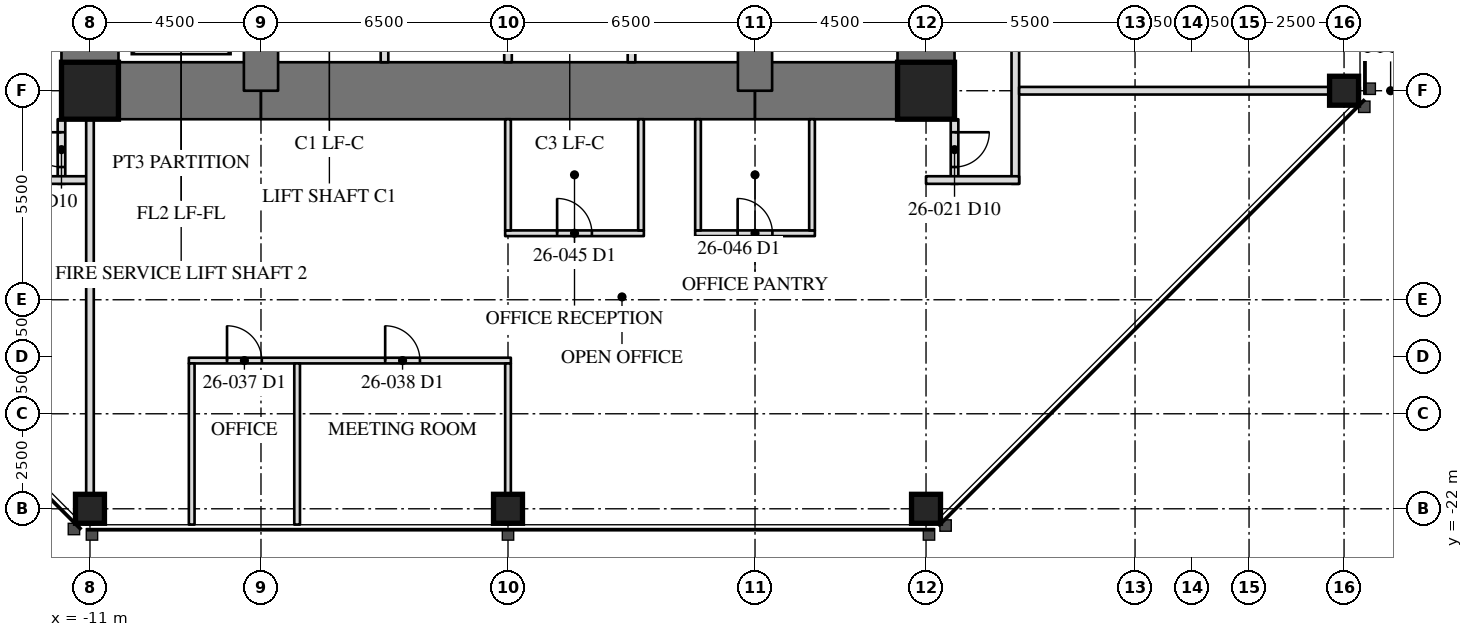
"""IFC4 building model, lengths in metres.
Left out: names, types, materials, properties, quantities, classifications, styles, units other than length and angle.
Written with IfcOpenShell. Run it as: python <this file> out.ifc"""

import sys

from ifc_helpers import new_model, si_unit, direction, frame, frame_2d, origin, origin_2d, place, context, subcontext, project, spatial, rectangle, hollow_rectangle, extrude, element, fill, save


model = new_model("IFC4")
c1 = context("Model", 3, precision=1e-05, world=origin(), true_north=direction((0.0, 1.0)))
c2 = subcontext(c1, "Body", "Model", "MODEL_VIEW")
j1 = project(units=[si_unit("LENGTHUNIT", "METRE"), si_unit("PLANEANGLEUNIT", "RADIAN")], contexts=[c1])
p1 = place(None, origin())
s1 = spatial("IfcSite", under=j1, at=p1, CompositionType="ELEMENT")
p2 = place(p1, origin())
s2 = spatial("IfcBuilding", under=s1, at=p2, CompositionType="ELEMENT")
p3 = place(p2, frame((0.0, 0.0, 113.1)))
s3 = spatial("IfcBuildingStorey", under=s2, at=p3, CompositionType="ELEMENT", Elevation=113.1)
for number, where, z_axis, x_axis in (
    (1, (-11.0, -22.0, 0.0), (0.0, 0.0, 1.0), (1.0, 0.0, 0.0)),
    (2, (0.0, -22.0, 0.0), (0.0, 0.0, 1.0), (1.0, 0.0, 0.0)),
    (3, (11.0, -22.0, 0.0), (0.0, 0.0, 1.0), (1.0, 0.0, 0.0)),
    (4, (22.0, -11.0, 0.0), (0.0, 0.0, 1.0), (0.0, 1.0, 0.0)),
):
    element("IfcColumn", number, at=place(p3, frame(where, z_axis=z_axis, x_axis=x_axis)), inside=s3, PredefinedType="COLUMN", context=c2, shape_type="SweptSolid", body=[
        extrude(hollow_rectangle(XDim=0.762, YDim=0.762, WallThickness=0.127, at=origin_2d()), origin(), (0.0, 0.0, 1.0), 4.1),
    ])
p4 = place(p3, frame((11.0, -11.0, 0.0), z_axis=(0.0, 0.0, 1.0), x_axis=(0.0, 1.0, 0.0)))
e5 = element("IfcWall", 5, at=p4, inside=s3, PredefinedType="SHEAR", context=c2, shape_type="SweptSolid", body=[
    extrude(rectangle(XDim=22.0, YDim=1.5, at=frame_2d((11.0, 0.0))), origin(), (0.0, 0.0, 1.0), 4.1),
])
p5 = place(p4, frame((15.393, 0.0, 0.0)))
e6 = element("IfcOpeningElement", 6, at=p5, cuts=e5, PredefinedType="OPENING", context=c2, shape_type="SweptSolid", body=[
    extrude(rectangle(XDim=0.915, YDim=2.134, at=frame_2d((0.458, 1.067))), frame((0.0, 0.76, 0.0), z_axis=(0.0, -1.0, 0.0), x_axis=(1.0, 0.0, 0.0)), (0.0, 0.0, 1.0), 1.52),
])
p6 = place(p3, frame((-11.0, 11.0, 0.0), z_axis=(0.0, 0.0, 1.0), x_axis=(0.0, -1.0, 0.0)))
e7 = element("IfcWall", 7, at=p6, inside=s3, PredefinedType="SHEAR", context=c2, shape_type="SweptSolid", body=[
    extrude(rectangle(XDim=22.0, YDim=1.5, at=frame_2d((11.0, 0.0))), origin(), (0.0, 0.0, 1.0), 4.1),
])
p7 = place(p6, frame((15.393, 0.0, 0.0)))
e8 = element("IfcOpeningElement", 8, at=p7, cuts=e7, PredefinedType="OPENING", context=c2, shape_type="SweptSolid", body=[
    extrude(rectangle(XDim=0.915, YDim=2.134, at=frame_2d((0.458, 1.067))), frame((0.0, 0.76, 0.0), z_axis=(0.0, -1.0, 0.0), x_axis=(1.0, 0.0, 0.0)), (0.0, 0.0, 1.0), 1.52),
])
p8 = place(p3, frame((-11.0, -11.0, 0.0), z_axis=(0.0, 0.0, 1.0), x_axis=(1.0, 0.0, 0.0)))
e9 = element("IfcWall", 9, at=p8, inside=s3, PredefinedType="SHEAR", context=c2, shape_type="SweptSolid", body=[
    extrude(rectangle(XDim=4.5, YDim=1.5, at=frame_2d((2.25, 0.0))), origin(), (0.0, 0.0, 1.0), 4.1),
])
p9 = place(p3, frame((-6.5, -11.0, 0.0), z_axis=(0.0, 0.0, 1.0), x_axis=(1.0, 0.0, 0.0)))
e10 = element("IfcWall", 10, at=p9, inside=s3, PredefinedType="SHEAR", context=c2, shape_type="SweptSolid", body=[
    extrude(rectangle(XDim=13.0, YDim=1.5, at=frame_2d((6.5, 0.0))), origin(), (0.0, 0.0, 1.0), 4.1),
])
p10 = place(p3, frame((6.5, -11.0, 0.0), z_axis=(0.0, 0.0, 1.0), x_axis=(1.0, 0.0, 0.0)))
e11 = element("IfcWall", 11, at=p10, inside=s3, PredefinedType="SHEAR", context=c2, shape_type="SweptSolid", body=[
    extrude(rectangle(XDim=4.5, YDim=1.5, at=frame_2d((2.25, 0.0))), origin(), (0.0, 0.0, 1.0), 4.1),
])
for number, where, z_axis, x_axis in (
    (12, (6.5, -11.0, 0.0), (0.0, 0.0, 1.0), (0.0, 1.0, 0.0)),
    (13, (-6.5, -6.5, 0.0), (0.0, 0.0, 1.0), (0.0, -1.0, 0.0)),
):
    element("IfcWall", number, at=place(p3, frame(where, z_axis=z_axis, x_axis=x_axis)), inside=s3, PredefinedType="SHEAR", context=c2, shape_type="SweptSolid", body=[
        extrude(rectangle(XDim=4.5, YDim=0.9, at=frame_2d((2.25, 0.0))), origin(), (0.0, 0.0, 1.0), 4.1),
    ])
for number, where, z_axis, x_axis in (
    (14, (-11.0, -11.0, 0.0), (0.0, 0.0, 1.0), (1.0, 0.0, 0.0)),
    (15, (11.0, -11.0, 0.0), (0.0, 0.0, 1.0), (1.0, 0.0, 0.0)),
):
    element("IfcColumn", number, at=place(p3, frame(where, z_axis=z_axis, x_axis=x_axis)), inside=s3, PredefinedType="COLUMN", context=c2, shape_type="SweptSolid", body=[
        extrude(hollow_rectangle(XDim=1.499, YDim=1.499, WallThickness=0.102, at=origin_2d()), origin(), (0.0, 0.0, 1.0), 4.1),
    ])
for number, where, z_axis, x_axis in (
    (16, (-3.25, -10.25, 0.0), (0.0, 0.0, 1.0), (0.0, 1.0, 0.0)),
    (17, (0.0, -10.25, 0.0), (0.0, 0.0, 1.0), (0.0, 1.0, 0.0)),
    (18, (3.25, -10.25, 0.0), (0.0, 0.0, 1.0), (0.0, 1.0, 0.0)),
):
    element("IfcWall", number, at=place(p3, frame(where, z_axis=z_axis, x_axis=x_axis)), inside=s3, PredefinedType="PARTITIONING", context=c2, shape_type="SweptSolid", body=[
        extrude(rectangle(XDim=3.3, YDim=0.2, at=frame_2d((1.65, 0.0))), origin(), (0.0, 0.0, 1.0), 3.91),
    ])
p11 = place(p3, frame((13.35, -13.45, 0.0), z_axis=(0.0, 0.0, 1.0), x_axis=(0.0, 1.0, 0.0)))
e19 = element("IfcWall", 19, at=p11, inside=s3, PredefinedType="PARTITIONING", context=c2, shape_type="SweptSolid", body=[
    extrude(rectangle(XDim=26.7, YDim=0.2, at=frame_2d((13.35, 0.0))), origin(), (0.0, 0.0, 1.0), 3.91),
])
p12 = place(p11, frame((6.742, 0.0, 0.0)))
e20 = element("IfcOpeningElement", 20, at=p12, cuts=e19, PredefinedType="OPENING", context=c2, shape_type="SweptSolid", body=[
    extrude(rectangle(XDim=0.915, YDim=2.134, at=frame_2d((0.458, 1.067))), frame((0.0, 0.11, 0.0), z_axis=(0.0, -1.0, 0.0), x_axis=(1.0, 0.0, 0.0)), (0.0, 0.0, 1.0), 0.22),
])
p13 = place(p3, frame((11.75, -11.75, 0.0), z_axis=(0.0, 0.0, 1.0), x_axis=(0.0, -1.0, 0.0)))
e21 = element("IfcWall", 21, at=p13, inside=s3, PredefinedType="PARTITIONING", context=c2, shape_type="SweptSolid", body=[
    extrude(rectangle(XDim=1.7, YDim=0.2, at=frame_2d((0.85, 0.0))), origin(), (0.0, 0.0, 1.0), 3.91),
])
p14 = place(p13, frame((0.343, 0.0, 0.0)))
e22 = element("IfcOpeningElement", 22, at=p14, cuts=e21, PredefinedType="OPENING", context=c2, shape_type="SweptSolid", body=[
    extrude(rectangle(XDim=0.915, YDim=2.134, at=frame_2d((0.458, 1.067))), frame((0.0, 0.11, 0.0), z_axis=(0.0, -1.0, 0.0), x_axis=(1.0, 0.0, 0.0)), (0.0, 0.0, 1.0), 0.22),
])
p15 = place(p3, frame((11.0, -13.35, 0.0), z_axis=(0.0, 0.0, 1.0), x_axis=(1.0, 0.0, 0.0)))
e23 = element("IfcWall", 23, at=p15, inside=s3, PredefinedType="PARTITIONING", context=c2, shape_type="SweptSolid", body=[
    extrude(rectangle(XDim=2.45, YDim=0.2, at=frame_2d((1.225, 0.0))), origin(), (0.0, 0.0, 1.0), 3.91),
])
p16 = place(p3, frame((-11.75, -11.75, 0.0), z_axis=(0.0, 0.0, 1.0), x_axis=(0.0, -1.0, 0.0)))
e24 = element("IfcWall", 24, at=p16, inside=s3, PredefinedType="PARTITIONING", context=c2, shape_type="SweptSolid", body=[
    extrude(rectangle(XDim=1.7, YDim=0.2, at=frame_2d((0.85, 0.0))), origin(), (0.0, 0.0, 1.0), 3.91),
])
p17 = place(p16, frame((0.343, 0.0, 0.0)))
e25 = element("IfcOpeningElement", 25, at=p17, cuts=e24, PredefinedType="OPENING", context=c2, shape_type="SweptSolid", body=[
    extrude(rectangle(XDim=0.915, YDim=2.134, at=frame_2d((0.458, 1.067))), frame((0.0, 0.11, 0.0), z_axis=(0.0, -1.0, 0.0), x_axis=(1.0, 0.0, 0.0)), (0.0, 0.0, 1.0), 0.22),
])
p18 = place(p3, frame((-11.0, -13.35, 0.0), z_axis=(0.0, 0.0, 1.0), x_axis=(-1.0, 0.0, 0.0)))
e26 = element("IfcWall", 26, at=p18, inside=s3, PredefinedType="PARTITIONING", context=c2, shape_type="SweptSolid", body=[
    extrude(rectangle(XDim=2.45, YDim=0.2, at=frame_2d((1.225, 0.0))), origin(), (0.0, 0.0, 1.0), 3.91),
])
p19 = place(p3, frame((-11.0, -11.75, 0.0), z_axis=(0.0, 0.0, 1.0), x_axis=(0.0, -1.0, 0.0)))
e27 = element("IfcWall", 27, at=p19, inside=s3, PredefinedType="PARTITIONING", context=c2, shape_type="SweptSolid", body=[
    extrude(rectangle(XDim=10.665, YDim=0.2, at=frame_2d((5.333, 0.0))), origin(), (0.0, 0.0, 1.0), 3.326),
])
p20 = place(p3, frame((13.45, -11.0, 0.0), z_axis=(0.0, 0.0, 1.0), x_axis=(1.0, 0.0, 0.0)))
e28 = element("IfcWall", 28, at=p20, inside=s3, PredefinedType="PARTITIONING", context=c2, shape_type="SweptSolid", body=[
    extrude(rectangle(XDim=8.965, YDim=0.2, at=frame_2d((4.482, 0.0))), origin(), (0.0, 0.0, 1.0), 3.326),
])
p21 = place(p3, frame((-8.398, -18.1, 0.0), z_axis=(0.0, 0.0, 1.0), x_axis=(1.0, 0.0, 0.0)))
e29 = element("IfcWall", 29, at=p21, inside=s3, PredefinedType="PARTITIONING", context=c2, shape_type="SweptSolid", body=[
    extrude(rectangle(XDim=8.473, YDim=0.15, at=frame_2d((4.236, 0.0))), origin(), (0.0, 0.0, 1.0), 3.91),
])
p22 = place(p21, frame((1.004, 0.0, 0.0)))
e30 = element("IfcOpeningElement", 30, at=p22, cuts=e29, PredefinedType="OPENING", context=c2, shape_type="SweptSolid", body=[
    extrude(rectangle(XDim=0.915, YDim=2.134, at=frame_2d((0.458, 1.067))), frame((0.0, 0.085, 0.0), z_axis=(0.0, -1.0, 0.0), x_axis=(1.0, 0.0, 0.0)), (0.0, 0.0, 1.0), 0.17),
])
p23 = place(p21, frame((5.166, 0.0, 0.0)))
e31 = element("IfcOpeningElement", 31, at=p23, cuts=e29, PredefinedType="OPENING", context=c2, shape_type="SweptSolid", body=[
    extrude(rectangle(XDim=0.915, YDim=2.134, at=frame_2d((0.458, 1.067))), frame((0.0, 0.085, 0.0), z_axis=(0.0, -1.0, 0.0), x_axis=(1.0, 0.0, 0.0)), (0.0, 0.0, 1.0), 0.17),
])
for number, where, z_axis, x_axis in (
    (32, (-8.323, -18.175, 0.0), (0.0, 0.0, 1.0), (0.0, -1.0, 0.0)),
    (33, (-5.549, -18.175, 0.0), (0.0, 0.0, 1.0), (0.0, -1.0, 0.0)),
):
    element("IfcWall", number, at=place(p3, frame(where, z_axis=z_axis, x_axis=x_axis)), inside=s3, PredefinedType="PARTITIONING", context=c2, shape_type="SweptSolid", body=[
        extrude(rectangle(XDim=4.24, YDim=0.15, at=frame_2d((2.12, 0.0))), origin(), (0.0, 0.0, 1.0), 3.91),
    ])
p24 = place(p3, frame((0.0, -18.175, 0.0), z_axis=(0.0, 0.0, 1.0), x_axis=(0.0, -1.0, 0.0)))
e34 = element("IfcWall", 34, at=p24, inside=s3, PredefinedType="PARTITIONING", context=c2, shape_type="SweptSolid", body=[
    extrude(rectangle(XDim=4.24, YDim=0.15, at=frame_2d((2.12, 0.0))), origin(), (0.0, 0.0, 1.0), 3.326),
])
p25 = place(p3, frame((-0.075, -14.75, 0.0), z_axis=(0.0, 0.0, 1.0), x_axis=(1.0, 0.0, 0.0)))
e35 = element("IfcWall", 35, at=p25, inside=s3, PredefinedType="PARTITIONING", context=c2, shape_type="SweptSolid", body=[
    extrude(rectangle(XDim=3.65, YDim=0.15, at=frame_2d((1.825, 0.0))), origin(), (0.0, 0.0, 1.0), 3.91),
])
p26 = place(p25, frame((1.367, 0.0, 0.0)))
e36 = element("IfcOpeningElement", 36, at=p26, cuts=e35, PredefinedType="OPENING", context=c2, shape_type="SweptSolid", body=[
    extrude(rectangle(XDim=0.915, YDim=2.134, at=frame_2d((0.458, 1.067))), frame((0.0, 0.085, 0.0), z_axis=(0.0, -1.0, 0.0), x_axis=(1.0, 0.0, 0.0)), (0.0, 0.0, 1.0), 0.17),
])
p27 = place(p3, frame((0.0, -14.675, 0.0), z_axis=(0.0, 0.0, 1.0), x_axis=(0.0, 1.0, 0.0)))
e37 = element("IfcWall", 37, at=p27, inside=s3, PredefinedType="PARTITIONING", context=c2, shape_type="SweptSolid", body=[
    extrude(rectangle(XDim=2.925, YDim=0.15, at=frame_2d((1.462, 0.0))), origin(), (0.0, 0.0, 1.0), 3.326),
])
p28 = place(p3, frame((3.5, -14.675, 0.0), z_axis=(0.0, 0.0, 1.0), x_axis=(0.0, 1.0, 0.0)))
e38 = element("IfcWall", 38, at=p28, inside=s3, PredefinedType="PARTITIONING", context=c2, shape_type="SweptSolid", body=[
    extrude(rectangle(XDim=2.925, YDim=0.15, at=frame_2d((1.462, 0.0))), origin(), (0.0, 0.0, 1.0), 3.91),
])
p29 = place(p3, frame((4.925, -14.75, 0.0), z_axis=(0.0, 0.0, 1.0), x_axis=(1.0, 0.0, 0.0)))
e39 = element("IfcWall", 39, at=p29, inside=s3, PredefinedType="PARTITIONING", context=c2, shape_type="SweptSolid", body=[
    extrude(rectangle(XDim=3.15, YDim=0.15, at=frame_2d((1.575, 0.0))), origin(), (0.0, 0.0, 1.0), 3.91),
])
p30 = place(p29, frame((1.117, 0.0, 0.0)))
e40 = element("IfcOpeningElement", 40, at=p30, cuts=e39, PredefinedType="OPENING", context=c2, shape_type="SweptSolid", body=[
    extrude(rectangle(XDim=0.915, YDim=2.134, at=frame_2d((0.458, 1.067))), frame((0.0, 0.085, 0.0), z_axis=(0.0, -1.0, 0.0), x_axis=(1.0, 0.0, 0.0)), (0.0, 0.0, 1.0), 0.17),
])
for number, where, z_axis, x_axis in (
    (41, (5.0, -14.675, 0.0), (0.0, 0.0, 1.0), (0.0, 1.0, 0.0)),
    (42, (8.0, -14.675, 0.0), (0.0, 0.0, 1.0), (0.0, 1.0, 0.0)),
):
    element("IfcWall", number, at=place(p3, frame(where, z_axis=z_axis, x_axis=x_axis)), inside=s3, PredefinedType="PARTITIONING", context=c2, shape_type="SweptSolid", body=[
        extrude(rectangle(XDim=2.925, YDim=0.15, at=frame_2d((1.462, 0.0))), origin(), (0.0, 0.0, 1.0), 3.91),
    ])
p31 = place(p14, origin())
e43 = element("IfcDoor", 43, at=p31, inside=s3, OperationType="SINGLE_SWING_LEFT", PredefinedType="DOOR", context=c2, shape_type="SweptSolid", body=[
    extrude(rectangle(XDim=0.915, YDim=2.134, at=frame_2d((0.458, 1.067))), frame((0.0, 0.025, 0.0), z_axis=(0.0, -1.0, 0.0), x_axis=(1.0, 0.0, 0.0)), (0.0, 0.0, 1.0), 0.05),
])
fill(e22, e43)
p32 = place(p17, frame((0.915, 0.0, 0.0), z_axis=(0.0, 0.0, 1.0), x_axis=(-1.0, 0.0, 0.0)))
e44 = element("IfcDoor", 44, at=p32, inside=s3, OperationType="SINGLE_SWING_LEFT", PredefinedType="DOOR", context=c2, shape_type="SweptSolid", body=[
    extrude(rectangle(XDim=0.915, YDim=2.134, at=frame_2d((0.458, 1.067))), frame((0.0, 0.025, 0.0), z_axis=(0.0, -1.0, 0.0), x_axis=(1.0, 0.0, 0.0)), (0.0, 0.0, 1.0), 0.05),
])
fill(e25, e44)
p33 = place(p22, origin())
e45 = element("IfcDoor", 45, at=p33, inside=s3, OperationType="SINGLE_SWING_LEFT", PredefinedType="DOOR", context=c2, shape_type="SweptSolid", body=[
    extrude(rectangle(XDim=0.915, YDim=2.134, at=frame_2d((0.458, 1.067))), frame((0.0, 0.025, 0.0), z_axis=(0.0, -1.0, 0.0), x_axis=(1.0, 0.0, 0.0)), (0.0, 0.0, 1.0), 0.05),
])
fill(e30, e45)
p34 = place(p23, origin())
e46 = element("IfcDoor", 46, at=p34, inside=s3, OperationType="SINGLE_SWING_LEFT", PredefinedType="DOOR", context=c2, shape_type="SweptSolid", body=[
    extrude(rectangle(XDim=0.915, YDim=2.134, at=frame_2d((0.458, 1.067))), frame((0.0, 0.025, 0.0), z_axis=(0.0, -1.0, 0.0), x_axis=(1.0, 0.0, 0.0)), (0.0, 0.0, 1.0), 0.05),
])
fill(e31, e46)
p35 = place(p26, origin())
e47 = element("IfcDoor", 47, at=p35, inside=s3, OperationType="SINGLE_SWING_LEFT", PredefinedType="DOOR", context=c2, shape_type="SweptSolid", body=[
    extrude(rectangle(XDim=0.915, YDim=2.134, at=frame_2d((0.458, 1.067))), frame((0.0, 0.025, 0.0), z_axis=(0.0, -1.0, 0.0), x_axis=(1.0, 0.0, 0.0)), (0.0, 0.0, 1.0), 0.05),
])
fill(e36, e47)
p36 = place(p30, origin())
e48 = element("IfcDoor", 48, at=p36, inside=s3, OperationType="SINGLE_SWING_LEFT", PredefinedType="DOOR", context=c2, shape_type="SweptSolid", body=[
    extrude(rectangle(XDim=0.915, YDim=2.134, at=frame_2d((0.458, 1.067))), frame((0.0, 0.025, 0.0), z_axis=(0.0, -1.0, 0.0), x_axis=(1.0, 0.0, 0.0)), (0.0, 0.0, 1.0), 0.05),
])
fill(e40, e48)
save(model, sys.argv[1])
